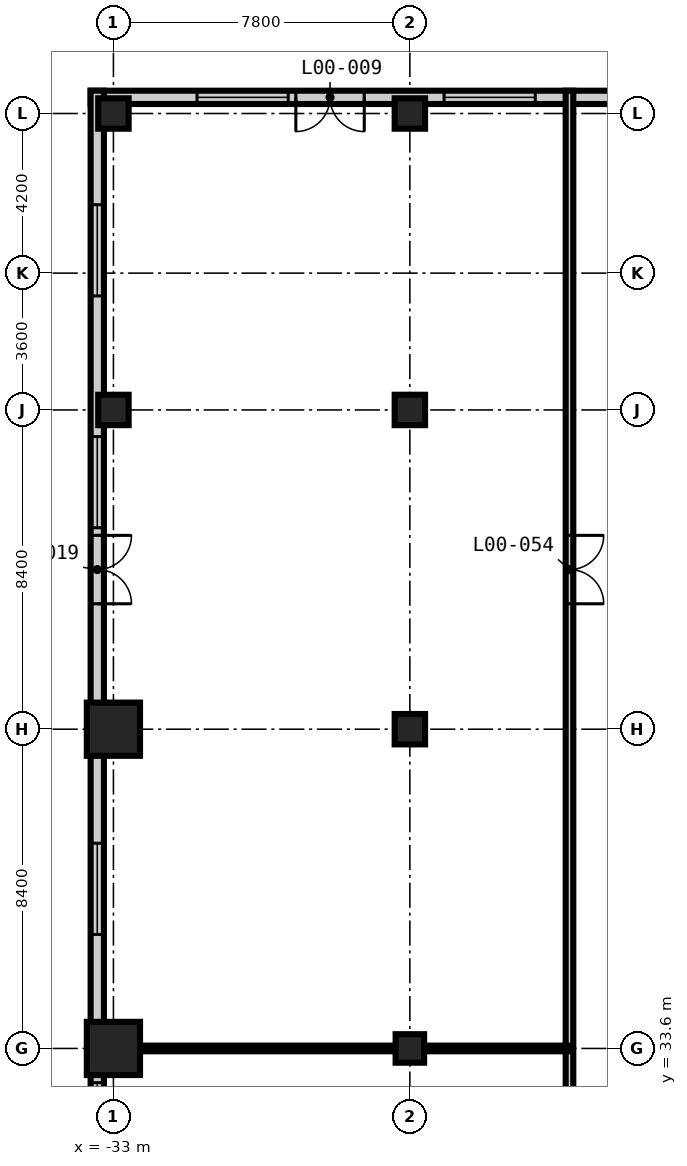
"""IFC4 building model, lengths in metres.
Left out: names, types, materials, properties, quantities, classifications, styles, units other than length and angle.
Written with IfcOpenShell. Run it as: python <this file> out.ifc"""

import sys

from ifc_helpers import new_model, si_unit, direction, frame, frame_2d, origin, origin_2d, place, context, subcontext, project, spatial, rectangle, extrude, element, fill, save


model = new_model("IFC4")
c1 = context("Model", 3, precision=1e-05, world=origin(), true_north=direction((0.0, 1.0)))
c2 = subcontext(c1, "Body", "Model", "MODEL_VIEW")
j1 = project(units=[si_unit("LENGTHUNIT", "METRE"), si_unit("PLANEANGLEUNIT", "RADIAN")], contexts=[c1])
p1 = place(None, origin())
s1 = spatial("IfcSite", under=j1, at=p1, CompositionType="ELEMENT")
p2 = place(p1, origin())
s2 = spatial("IfcBuilding", under=s1, at=p2, CompositionType="ELEMENT")
p3 = place(p2, origin())
s3 = spatial("IfcBuildingStorey", under=s2, at=p3, CompositionType="ELEMENT", Elevation=0.0)
p4 = place(p3, frame((-33.0, 33.6, -0.5), z_axis=(0.0, 0.0, 1.0), x_axis=(1.0, 0.0, 0.0)))
e1 = element("IfcColumn", 1, at=p4, inside=s3, PredefinedType="COLUMN", context=c2, shape_type="SweptSolid", body=[
    extrude(rectangle(XDim=1.4, YDim=1.4, at=origin_2d()), origin(), (0.0, 0.0, 1.0), 6.2),
])
p5 = place(p3, frame((-33.0, 42.0, -0.3), z_axis=(0.0, 0.0, 1.0), x_axis=(1.0, 0.0, 0.0)))
e2 = element("IfcColumn", 2, at=p5, inside=s3, PredefinedType="COLUMN", context=c2, shape_type="SweptSolid", body=[
    extrude(rectangle(XDim=1.4, YDim=1.4, at=origin_2d()), origin(), (0.0, 0.0, 1.0), 6.0),
])
for number, where, z_axis, x_axis in (
    (3, (-33.0, 50.4, -0.5), (0.0, 0.0, 1.0), (1.0, 0.0, 0.0)),
    (4, (-33.0, 58.2, -0.5), (0.0, 0.0, 1.0), (1.0, 0.0, 0.0)),
):
    element("IfcColumn", number, at=place(p3, frame(where, z_axis=z_axis, x_axis=x_axis)), inside=s3, PredefinedType="COLUMN", context=c2, shape_type="SweptSolid", body=[
        extrude(rectangle(XDim=0.8, YDim=0.8, at=origin_2d()), origin(), (0.0, 0.0, 1.0), 6.2),
    ])
p6 = place(p3, frame((-25.2, 33.6, -0.5), z_axis=(0.0, 0.0, 1.0), x_axis=(1.0, 0.0, 0.0)))
e5 = element("IfcColumn", 5, at=p6, inside=s3, PredefinedType="COLUMN", context=c2, shape_type="SweptSolid", body=[
    extrude(rectangle(XDim=0.75, YDim=0.75, at=origin_2d()), origin(), (0.0, 0.0, 1.0), 6.2),
])
p7 = place(p3, frame((-25.2, 42.0, -0.3), z_axis=(0.0, 0.0, 1.0), x_axis=(1.0, 0.0, 0.0)))
e6 = element("IfcColumn", 6, at=p7, inside=s3, PredefinedType="COLUMN", context=c2, shape_type="SweptSolid", body=[
    extrude(rectangle(XDim=0.8, YDim=0.8, at=origin_2d()), origin(), (0.0, 0.0, 1.0), 6.0),
])
for number, where, z_axis, x_axis in (
    (7, (-25.2, 50.4, -0.5), (0.0, 0.0, 1.0), (1.0, 0.0, 0.0)),
    (8, (-25.2, 58.2, -0.5), (0.0, 0.0, 1.0), (1.0, 0.0, 0.0)),
):
    element("IfcColumn", number, at=place(p3, frame(where, z_axis=z_axis, x_axis=x_axis)), inside=s3, PredefinedType="COLUMN", context=c2, shape_type="SweptSolid", body=[
        extrude(rectangle(XDim=0.8, YDim=0.8, at=origin_2d()), origin(), (0.0, 0.0, 1.0), 6.2),
    ])
p8 = place(p3, frame((58.8, 58.625, 0.0), z_axis=(0.0, 0.0, 1.0), x_axis=(-1.0, 0.0, 0.0)))
e9 = element("IfcWall", 9, at=p8, inside=s3, PredefinedType="SOLIDWALL", context=c2, shape_type="SweptSolid", body=[
    extrude(rectangle(XDim=92.4, YDim=0.35, at=frame_2d((46.2, 0.0))), origin(), (0.0, 0.0, 1.0), 5.7),
])
p9 = place(p8, frame((85.2, 0.0, 0.0)))
e10 = element("IfcOpeningElement", 10, at=p9, cuts=e9, PredefinedType="OPENING", context=c2, shape_type="SweptSolid", body=[
    extrude(rectangle(XDim=1.8, YDim=2.7, at=frame_2d((0.9, 1.35))), frame((0.0, 0.185, 0.0), z_axis=(0.0, -1.0, 0.0), x_axis=(1.0, 0.0, 0.0)), (0.0, 0.0, 1.0), 0.37),
])
p10 = place(p8, frame((87.2, 0.0, 0.9)))
e11 = element("IfcOpeningElement", 11, at=p10, cuts=e9, PredefinedType="OPENING", context=c2, shape_type="SweptSolid", body=[
    extrude(rectangle(XDim=2.4, YDim=2.4, at=frame_2d((1.2, 1.2))), frame((0.0, 0.185, 0.0), z_axis=(0.0, -1.0, 0.0), x_axis=(1.0, 0.0, 0.0)), (0.0, 0.0, 1.0), 0.37),
])
p11 = place(p8, frame((80.7, 0.0, 0.9)))
e12 = element("IfcOpeningElement", 12, at=p11, cuts=e9, PredefinedType="OPENING", context=c2, shape_type="SweptSolid", body=[
    extrude(rectangle(XDim=2.4, YDim=2.4, at=frame_2d((1.2, 1.2))), frame((0.0, 0.185, 0.0), z_axis=(0.0, -1.0, 0.0), x_axis=(1.0, 0.0, 0.0)), (0.0, 0.0, 1.0), 0.37),
])
p12 = place(p8, frame((76.2, 0.0, 0.9)))
e13 = element("IfcOpeningElement", 13, at=p12, cuts=e9, PredefinedType="OPENING", context=c2, shape_type="SweptSolid", body=[
    extrude(rectangle(XDim=2.4, YDim=2.4, at=frame_2d((1.2, 1.2))), frame((0.0, 0.185, 0.0), z_axis=(0.0, -1.0, 0.0), x_axis=(1.0, 0.0, 0.0)), (0.0, 0.0, 1.0), 0.37),
])
p13 = place(p8, frame((71.9, 0.0, 0.0)))
e14 = element("IfcOpeningElement", 14, at=p13, cuts=e9, PredefinedType="OPENING", context=c2, shape_type="SweptSolid", body=[
    extrude(rectangle(XDim=1.2, YDim=2.4, at=frame_2d((0.6, 1.2))), frame((0.0, 0.185, 0.0), z_axis=(0.0, -1.0, 0.0), x_axis=(1.0, 0.0, 0.0)), (0.0, 0.0, 1.0), 0.37),
])
p14 = place(p8, frame((63.5, 0.0, 0.0)))
e15 = element("IfcOpeningElement", 15, at=p14, cuts=e9, PredefinedType="OPENING", context=c2, shape_type="SweptSolid", body=[
    extrude(rectangle(XDim=1.2, YDim=2.4, at=frame_2d((0.6, 1.2))), frame((0.0, 0.185, 0.0), z_axis=(0.0, -1.0, 0.0), x_axis=(1.0, 0.0, 0.0)), (0.0, 0.0, 1.0), 0.37),
])
p15 = place(p8, frame((59.0, 0.0, 0.0)))
e16 = element("IfcOpeningElement", 16, at=p15, cuts=e9, PredefinedType="OPENING", context=c2, shape_type="SweptSolid", body=[
    extrude(rectangle(XDim=2.4, YDim=3.0, at=frame_2d((1.2, 1.5))), frame((0.0, 0.185, 0.0), z_axis=(0.0, -1.0, 0.0), x_axis=(1.0, 0.0, 0.0)), (0.0, 0.0, 1.0), 0.37),
])
p16 = place(p8, frame((53.4, 0.0, 0.9)))
e17 = element("IfcOpeningElement", 17, at=p16, cuts=e9, PredefinedType="OPENING", context=c2, shape_type="SweptSolid", body=[
    extrude(rectangle(XDim=2.4, YDim=2.4, at=frame_2d((1.2, 1.2))), frame((0.0, 0.185, 0.0), z_axis=(0.0, -1.0, 0.0), x_axis=(1.0, 0.0, 0.0)), (0.0, 0.0, 1.0), 0.37),
])
p17 = place(p8, frame((43.25, 0.0, 0.0)))
e18 = element("IfcOpeningElement", 18, at=p17, cuts=e9, PredefinedType="OPENING", context=c2, shape_type="SweptSolid", body=[
    extrude(rectangle(XDim=2.4, YDim=3.0, at=frame_2d((1.2, 1.5))), frame((0.0, 0.185, 0.0), z_axis=(0.0, -1.0, 0.0), x_axis=(1.0, 0.0, 0.0)), (0.0, 0.0, 1.0), 0.37),
])
p18 = place(p8, frame((37.7, 0.0, 0.0)))
e19 = element("IfcOpeningElement", 19, at=p18, cuts=e9, PredefinedType="OPENING", context=c2, shape_type="SweptSolid", body=[
    extrude(rectangle(XDim=1.2, YDim=2.4, at=frame_2d((0.6, 1.2))), frame((0.0, 0.185, 0.0), z_axis=(0.0, -1.0, 0.0), x_axis=(1.0, 0.0, 0.0)), (0.0, 0.0, 1.0), 0.37),
])
p19 = place(p8, frame((29.2, 0.0, 0.0)))
e20 = element("IfcOpeningElement", 20, at=p19, cuts=e9, PredefinedType="OPENING", context=c2, shape_type="SweptSolid", body=[
    extrude(rectangle(XDim=1.2, YDim=2.4, at=frame_2d((0.6, 1.2))), frame((0.0, 0.185, 0.0), z_axis=(0.0, -1.0, 0.0), x_axis=(1.0, 0.0, 0.0)), (0.0, 0.0, 1.0), 0.37),
])
p20 = place(p8, frame((3.5, 0.0, 0.0)))
e21 = element("IfcOpeningElement", 21, at=p20, cuts=e9, PredefinedType="OPENING", context=c2, shape_type="SweptSolid", body=[
    extrude(rectangle(XDim=3.6, YDim=4.5, at=frame_2d((1.8, 2.25))), frame((0.0, 0.185, 0.0), z_axis=(0.0, -1.0, 0.0), x_axis=(1.0, 0.0, 0.0)), (0.0, 0.0, 1.0), 0.37),
])
p21 = place(p8, frame((11.4, 0.0, 0.9)))
e22 = element("IfcOpeningElement", 22, at=p21, cuts=e9, PredefinedType="OPENING", context=c2, shape_type="SweptSolid", body=[
    extrude(rectangle(XDim=2.4, YDim=2.4, at=frame_2d((1.2, 1.2))), frame((0.0, 0.185, 0.0), z_axis=(0.0, -1.0, 0.0), x_axis=(1.0, 0.0, 0.0)), (0.0, 0.0, 1.0), 0.37),
])
p22 = place(p3, frame((-33.425, 58.8, 0.0), z_axis=(0.0, 0.0, 1.0), x_axis=(0.0, -1.0, 0.0)))
e23 = element("IfcWall", 23, at=p22, inside=s3, PredefinedType="SOLIDWALL", context=c2, shape_type="SweptSolid", body=[
    extrude(rectangle(XDim=67.2, YDim=0.35, at=frame_2d((33.6, 0.0))), origin(), (0.0, 0.0, 1.0), 5.7),
])
p23 = place(p22, frame((55.8, 0.0, 0.0)))
e24 = element("IfcOpeningElement", 24, at=p23, cuts=e23, PredefinedType="OPENING", context=c2, shape_type="SweptSolid", body=[
    extrude(rectangle(XDim=1.8, YDim=2.7, at=frame_2d((0.9, 1.35))), frame((0.0, 0.185, 0.0), z_axis=(0.0, -1.0, 0.0), x_axis=(1.0, 0.0, 0.0)), (0.0, 0.0, 1.0), 0.37),
])
p24 = place(p22, frame((61.8, 0.0, 0.9)))
e25 = element("IfcOpeningElement", 25, at=p24, cuts=e23, PredefinedType="OPENING", context=c2, shape_type="SweptSolid", body=[
    extrude(rectangle(XDim=2.4, YDim=2.4, at=frame_2d((1.2, 1.2))), frame((0.0, 0.185, 0.0), z_axis=(0.0, -1.0, 0.0), x_axis=(1.0, 0.0, 0.0)), (0.0, 0.0, 1.0), 0.37),
])
p25 = place(p22, frame((53.2, 0.0, 0.9)))
e26 = element("IfcOpeningElement", 26, at=p25, cuts=e23, PredefinedType="OPENING", context=c2, shape_type="SweptSolid", body=[
    extrude(rectangle(XDim=2.4, YDim=2.4, at=frame_2d((1.2, 1.2))), frame((0.0, 0.185, 0.0), z_axis=(0.0, -1.0, 0.0), x_axis=(1.0, 0.0, 0.0)), (0.0, 0.0, 1.0), 0.37),
])
p26 = place(p22, frame((47.1, 0.0, 0.9)))
e27 = element("IfcOpeningElement", 27, at=p26, cuts=e23, PredefinedType="OPENING", context=c2, shape_type="SweptSolid", body=[
    extrude(rectangle(XDim=2.4, YDim=2.4, at=frame_2d((1.2, 1.2))), frame((0.0, 0.185, 0.0), z_axis=(0.0, -1.0, 0.0), x_axis=(1.0, 0.0, 0.0)), (0.0, 0.0, 1.0), 0.37),
])
p27 = place(p22, frame((34.8, 0.0, 0.0)))
e28 = element("IfcOpeningElement", 28, at=p27, cuts=e23, PredefinedType="OPENING", context=c2, shape_type="SweptSolid", body=[
    extrude(rectangle(XDim=1.8, YDim=2.7, at=frame_2d((0.9, 1.35))), frame((0.0, 0.185, 0.0), z_axis=(0.0, -1.0, 0.0), x_axis=(1.0, 0.0, 0.0)), (0.0, 0.0, 1.0), 0.37),
])
p28 = place(p22, frame((38.8, 0.0, 0.9)))
e29 = element("IfcOpeningElement", 29, at=p28, cuts=e23, PredefinedType="OPENING", context=c2, shape_type="SweptSolid", body=[
    extrude(rectangle(XDim=2.4, YDim=2.4, at=frame_2d((1.2, 1.2))), frame((0.0, 0.185, 0.0), z_axis=(0.0, -1.0, 0.0), x_axis=(1.0, 0.0, 0.0)), (0.0, 0.0, 1.0), 0.37),
])
p29 = place(p22, frame((30.4, 0.0, 0.9)))
e30 = element("IfcOpeningElement", 30, at=p29, cuts=e23, PredefinedType="OPENING", context=c2, shape_type="SweptSolid", body=[
    extrude(rectangle(XDim=2.4, YDim=2.4, at=frame_2d((1.2, 1.2))), frame((0.0, 0.185, 0.0), z_axis=(0.0, -1.0, 0.0), x_axis=(1.0, 0.0, 0.0)), (0.0, 0.0, 1.0), 0.37),
])
p30 = place(p22, frame((26.1, 0.0, 0.9)))
e31 = element("IfcOpeningElement", 31, at=p30, cuts=e23, PredefinedType="OPENING", context=c2, shape_type="SweptSolid", body=[
    extrude(rectangle(XDim=2.4, YDim=2.4, at=frame_2d((1.2, 1.2))), frame((0.0, 0.185, 0.0), z_axis=(0.0, -1.0, 0.0), x_axis=(1.0, 0.0, 0.0)), (0.0, 0.0, 1.0), 0.37),
])
p31 = place(p22, frame((11.7, 0.0, 0.0)))
e32 = element("IfcOpeningElement", 32, at=p31, cuts=e23, PredefinedType="OPENING", context=c2, shape_type="SweptSolid", body=[
    extrude(rectangle(XDim=1.8, YDim=2.7, at=frame_2d((0.9, 1.35))), frame((0.0, 0.185, 0.0), z_axis=(0.0, -1.0, 0.0), x_axis=(1.0, 0.0, 0.0)), (0.0, 0.0, 1.0), 0.37),
])
p32 = place(p22, frame((19.8, 0.0, 0.9)))
e33 = element("IfcOpeningElement", 33, at=p32, cuts=e23, PredefinedType="OPENING", context=c2, shape_type="SweptSolid", body=[
    extrude(rectangle(XDim=2.4, YDim=2.4, at=frame_2d((1.2, 1.2))), frame((0.0, 0.185, 0.0), z_axis=(0.0, -1.0, 0.0), x_axis=(1.0, 0.0, 0.0)), (0.0, 0.0, 1.0), 0.37),
])
p33 = place(p22, frame((9.1, 0.0, 0.9)))
e34 = element("IfcOpeningElement", 34, at=p33, cuts=e23, PredefinedType="OPENING", context=c2, shape_type="SweptSolid", body=[
    extrude(rectangle(XDim=2.4, YDim=2.4, at=frame_2d((1.2, 1.2))), frame((0.0, 0.185, 0.0), z_axis=(0.0, -1.0, 0.0), x_axis=(1.0, 0.0, 0.0)), (0.0, 0.0, 1.0), 0.37),
])
p34 = place(p22, frame((3.0, 0.0, 0.9)))
e35 = element("IfcOpeningElement", 35, at=p34, cuts=e23, PredefinedType="OPENING", context=c2, shape_type="SweptSolid", body=[
    extrude(rectangle(XDim=2.4, YDim=2.4, at=frame_2d((1.2, 1.2))), frame((0.0, 0.185, 0.0), z_axis=(0.0, -1.0, 0.0), x_axis=(1.0, 0.0, 0.0)), (0.0, 0.0, 1.0), 0.37),
])
p35 = place(p3, frame((-21.0, 58.8, 0.0), z_axis=(0.0, 0.0, 1.0), x_axis=(0.0, -1.0, 0.0)))
e36 = element("IfcWall", 36, at=p35, inside=s3, PredefinedType="PARTITIONING", context=c2, shape_type="SweptSolid", body=[
    extrude(rectangle(XDim=67.2, YDim=0.2, at=frame_2d((33.6, 0.0))), origin(), (0.0, 0.0, 1.0), 5.7),
])
p36 = place(p35, frame((55.8, 0.0, 0.0)))
e37 = element("IfcOpeningElement", 37, at=p36, cuts=e36, PredefinedType="OPENING", context=c2, shape_type="SweptSolid", body=[
    extrude(rectangle(XDim=1.8, YDim=2.7, at=frame_2d((0.9, 1.35))), frame((0.0, 0.11, 0.0), z_axis=(0.0, -1.0, 0.0), x_axis=(1.0, 0.0, 0.0)), (0.0, 0.0, 1.0), 0.22),
])
p37 = place(p35, frame((34.8, 0.0, 0.0)))
e38 = element("IfcOpeningElement", 38, at=p37, cuts=e36, PredefinedType="OPENING", context=c2, shape_type="SweptSolid", body=[
    extrude(rectangle(XDim=1.8, YDim=2.7, at=frame_2d((0.9, 1.35))), frame((0.0, 0.11, 0.0), z_axis=(0.0, -1.0, 0.0), x_axis=(1.0, 0.0, 0.0)), (0.0, 0.0, 1.0), 0.22),
])
p38 = place(p35, frame((11.7, 0.0, 0.0)))
e39 = element("IfcOpeningElement", 39, at=p38, cuts=e36, PredefinedType="OPENING", context=c2, shape_type="SweptSolid", body=[
    extrude(rectangle(XDim=1.8, YDim=2.7, at=frame_2d((0.9, 1.35))), frame((0.0, 0.11, 0.0), z_axis=(0.0, -1.0, 0.0), x_axis=(1.0, 0.0, 0.0)), (0.0, 0.0, 1.0), 0.22),
])
p39 = place(p3, frame((-33.6, 33.6, 0.0), z_axis=(0.0, 0.0, 1.0), x_axis=(1.0, 0.0, 0.0)))
e40 = element("IfcWall", 40, at=p39, inside=s3, PredefinedType="PARTITIONING", context=c2, shape_type="SweptSolid", body=[
    extrude(rectangle(XDim=12.6, YDim=0.15, at=frame_2d((6.3, 0.0))), origin(), (0.0, 0.0, 1.0), 5.7),
])
p40 = place(p9, origin())
e41 = element("IfcDoor", 41, at=p40, inside=s3, OperationType="DOUBLE_DOOR_DOUBLE_SWING", PredefinedType="DOOR", context=c2, shape_type="SweptSolid", body=[
    extrude(rectangle(XDim=1.8, YDim=2.7, at=frame_2d((0.9, 1.35))), frame((0.0, 0.025, 0.0), z_axis=(0.0, -1.0, 0.0), x_axis=(1.0, 0.0, 0.0)), (0.0, 0.0, 1.0), 0.05),
])
fill(e10, e41)
p41 = place(p10, origin())
e42 = element("IfcWindow", 42, at=p41, inside=s3, PartitioningType="SINGLE_PANEL", PredefinedType="WINDOW", context=c2, shape_type="SweptSolid", body=[
    extrude(rectangle(XDim=2.4, YDim=2.4, at=frame_2d((1.2, 1.2))), frame((0.0, 0.03, 0.0), z_axis=(0.0, -1.0, 0.0), x_axis=(1.0, 0.0, 0.0)), (0.0, 0.0, 1.0), 0.06),
])
fill(e11, e42)
p42 = place(p11, origin())
e43 = element("IfcWindow", 43, at=p42, inside=s3, PartitioningType="SINGLE_PANEL", PredefinedType="WINDOW", context=c2, shape_type="SweptSolid", body=[
    extrude(rectangle(XDim=2.4, YDim=2.4, at=frame_2d((1.2, 1.2))), frame((0.0, 0.03, 0.0), z_axis=(0.0, -1.0, 0.0), x_axis=(1.0, 0.0, 0.0)), (0.0, 0.0, 1.0), 0.06),
])
fill(e12, e43)
p43 = place(p30, origin())
e44 = element("IfcWindow", 44, at=p43, inside=s3, PartitioningType="SINGLE_PANEL", PredefinedType="WINDOW", context=c2, shape_type="SweptSolid", body=[
    extrude(rectangle(XDim=2.4, YDim=2.4, at=frame_2d((1.2, 1.2))), frame((0.0, 0.03, 0.0), z_axis=(0.0, -1.0, 0.0), x_axis=(1.0, 0.0, 0.0)), (0.0, 0.0, 1.0), 0.06),
])
fill(e31, e44)
p44 = place(p31, origin())
e45 = element("IfcDoor", 45, at=p44, inside=s3, OperationType="DOUBLE_DOOR_DOUBLE_SWING", PredefinedType="DOOR", context=c2, shape_type="SweptSolid", body=[
    extrude(rectangle(XDim=1.8, YDim=2.7, at=frame_2d((0.9, 1.35))), frame((0.0, 0.025, 0.0), z_axis=(0.0, -1.0, 0.0), x_axis=(1.0, 0.0, 0.0)), (0.0, 0.0, 1.0), 0.05),
])
fill(e32, e45)
p45 = place(p32, origin())
e46 = element("IfcWindow", 46, at=p45, inside=s3, PartitioningType="SINGLE_PANEL", PredefinedType="WINDOW", context=c2, shape_type="SweptSolid", body=[
    extrude(rectangle(XDim=2.4, YDim=2.4, at=frame_2d((1.2, 1.2))), frame((0.0, 0.03, 0.0), z_axis=(0.0, -1.0, 0.0), x_axis=(1.0, 0.0, 0.0)), (0.0, 0.0, 1.0), 0.06),
])
fill(e33, e46)
p46 = place(p33, origin())
e47 = element("IfcWindow", 47, at=p46, inside=s3, PartitioningType="SINGLE_PANEL", PredefinedType="WINDOW", context=c2, shape_type="SweptSolid", body=[
    extrude(rectangle(XDim=2.4, YDim=2.4, at=frame_2d((1.2, 1.2))), frame((0.0, 0.03, 0.0), z_axis=(0.0, -1.0, 0.0), x_axis=(1.0, 0.0, 0.0)), (0.0, 0.0, 1.0), 0.06),
])
fill(e34, e47)
p47 = place(p34, origin())
e48 = element("IfcWindow", 48, at=p47, inside=s3, PartitioningType="SINGLE_PANEL", PredefinedType="WINDOW", context=c2, shape_type="SweptSolid", body=[
    extrude(rectangle(XDim=2.4, YDim=2.4, at=frame_2d((1.2, 1.2))), frame((0.0, 0.03, 0.0), z_axis=(0.0, -1.0, 0.0), x_axis=(1.0, 0.0, 0.0)), (0.0, 0.0, 1.0), 0.06),
])
fill(e35, e48)
p48 = place(p38, origin())
e49 = element("IfcDoor", 49, at=p48, inside=s3, OperationType="DOUBLE_DOOR_DOUBLE_SWING", PredefinedType="DOOR", context=c2, shape_type="SweptSolid", body=[
    extrude(rectangle(XDim=1.8, YDim=2.7, at=frame_2d((0.9, 1.35))), frame((0.0, 0.025, 0.0), z_axis=(0.0, -1.0, 0.0), x_axis=(1.0, 0.0, 0.0)), (0.0, 0.0, 1.0), 0.05),
])
fill(e39, e49)
save(model, sys.argv[1])
